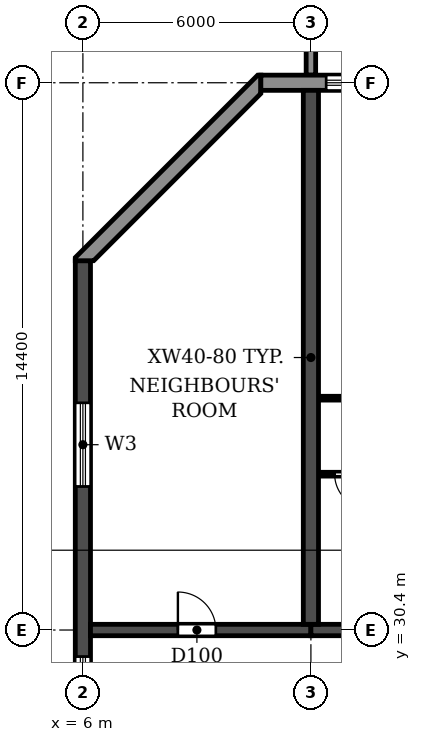
"""IFC4 building model, lengths in metres.
Left out: names, types, materials, properties, quantities, classifications, styles, units other than length and angle.
Written with IfcOpenShell. Run it as: python <this file> out.ifc"""

import sys

from ifc_helpers import new_model, si_unit, direction, frame, frame_2d, origin, place, context, subcontext, project, spatial, polyline, rectangle, outline, extrude, source, transform, mapped, element, fill, save


model = new_model("IFC4")
c1 = context("Model", 3, precision=1e-05, world=origin(), true_north=direction((0.0, 1.0)))
c2 = subcontext(c1, "Body", "Model", "MODEL_VIEW")
j1 = project(units=[si_unit("LENGTHUNIT", "METRE"), si_unit("PLANEANGLEUNIT", "RADIAN")], contexts=[c1])
p1 = place(None, origin())
s1 = spatial("IfcSite", under=j1, at=p1, CompositionType="ELEMENT")
p2 = place(p1, origin())
s2 = spatial("IfcBuilding", under=s1, at=p2, CompositionType="ELEMENT")
p3 = place(p2, frame((0.0, 0.0, 56.4)))
s3 = spatial("IfcBuildingStorey", under=s2, at=p3, CompositionType="ELEMENT", Elevation=56.4)
p4 = place(p3, frame((12.0, 30.55, 0.0), z_axis=(0.0, 0.0, 1.0), x_axis=(0.0, 1.0, 0.0)))
e1 = element("IfcWall", 1, at=p4, inside=s3, PredefinedType="SHEAR", context=c2, shape_type="SweptSolid", body=[
    extrude(rectangle(XDim=14.05, YDim=0.4, at=frame_2d((7.025, 0.0))), origin(), (0.0, 0.0, 1.0), 3.05),
])
p5 = place(p3, frame((6.0, 4.683, 0.0), z_axis=(0.0, 0.0, 1.0), x_axis=(0.0, 1.0, 0.0)))
e2 = element("IfcWall", 2, at=p5, inside=s3, PredefinedType="SHEAR", context=c2, shape_type="SweptSolid", body=[
    extrude(rectangle(XDim=35.434, YDim=0.4, at=frame_2d((17.717, 0.0))), origin(), (0.0, 0.0, 1.0), 3.05),
])
p6 = place(p5, frame((23.817, 0.0, 0.9)))
e3 = element("IfcOpeningElement", 3, at=p6, cuts=e2, PredefinedType="OPENING", context=c2, shape_type="SweptSolid", body=[
    extrude(rectangle(XDim=1.2, YDim=1.5, at=frame_2d((0.6, 0.75))), frame((0.0, 0.21, 0.0), z_axis=(0.0, -1.0, 0.0), x_axis=(1.0, 0.0, 0.0)), (0.0, 0.0, 1.0), 0.42),
])
p7 = place(p5, frame((8.017, 0.0, 0.9)))
e4 = element("IfcOpeningElement", 4, at=p7, cuts=e2, PredefinedType="OPENING", context=c2, shape_type="SweptSolid", body=[
    extrude(rectangle(XDim=1.2, YDim=1.5, at=frame_2d((0.6, 0.75))), frame((0.0, 0.21, 0.0), z_axis=(0.0, -1.0, 0.0), x_axis=(1.0, 0.0, 0.0)), (0.0, 0.0, 1.0), 0.42),
])
p8 = place(p5, frame((15.917, 0.0, 0.9)))
e5 = element("IfcOpeningElement", 5, at=p8, cuts=e2, PredefinedType="OPENING", context=c2, shape_type="SweptSolid", body=[
    extrude(rectangle(XDim=1.2, YDim=1.5, at=frame_2d((0.6, 0.75))), frame((0.0, 0.21, 0.0), z_axis=(0.0, -1.0, 0.0), x_axis=(1.0, 0.0, 0.0)), (0.0, 0.0, 1.0), 0.42),
])
p9 = place(p5, frame((29.493, 0.0, 0.6)))
e6 = element("IfcOpeningElement", 6, at=p9, cuts=e2, PredefinedType="OPENING", context=c2, shape_type="SweptSolid", body=[
    extrude(rectangle(XDim=2.2, YDim=1.8, at=frame_2d((1.1, 0.9))), frame((0.0, 0.21, 0.0), z_axis=(0.0, -1.0, 0.0), x_axis=(1.0, 0.0, 0.0)), (0.0, 0.0, 1.0), 0.42),
])
p10 = place(p5, frame((2.541, 0.0, 0.6)))
e7 = element("IfcOpeningElement", 7, at=p10, cuts=e2, PredefinedType="OPENING", context=c2, shape_type="SweptSolid", body=[
    extrude(rectangle(XDim=2.2, YDim=1.8, at=frame_2d((1.1, 0.9))), frame((0.0, 0.21, 0.0), z_axis=(0.0, -1.0, 0.0), x_axis=(1.0, 0.0, 0.0)), (0.0, 0.0, 1.0), 0.42),
])
p11 = place(p3, frame((6.2, 30.4, 0.0), z_axis=(0.0, 0.0, 1.0), x_axis=(1.0, 0.0, 0.0)))
e8 = element("IfcWall", 8, at=p11, inside=s3, PredefinedType="SHEAR", context=c2, shape_type="SweptSolid", body=[
    extrude(rectangle(XDim=5.8, YDim=0.3, at=frame_2d((2.9, 0.0))), origin(), (0.0, 0.0, 1.0), 2.45),
])
p12 = place(p11, frame((2.3, 0.0, 0.0)))
e9 = element("IfcOpeningElement", 9, at=p12, cuts=e8, PredefinedType="OPENING", context=c2, shape_type="SweptSolid", body=[
    extrude(rectangle(XDim=1.0, YDim=2.1, at=frame_2d((0.5, 1.05))), frame((0.0, 0.16, 0.0), z_axis=(0.0, -1.0, 0.0), x_axis=(1.0, 0.0, 0.0)), (0.0, 0.0, 1.0), 0.32),
])
p13 = place(p3, frame((12.0, 30.4, 0.0), z_axis=(0.0, 0.0, 1.0), x_axis=(1.0, 0.0, 0.0)))
e10 = element("IfcWall", 10, at=p13, inside=s3, PredefinedType="SHEAR", context=c2, shape_type="SweptSolid", body=[
    extrude(rectangle(XDim=6.0, YDim=0.3, at=frame_2d((3.0, 0.0))), origin(), (0.0, 0.0, 1.0), 2.45),
])
p14 = place(p13, frame((2.55, 0.0, 0.0)))
e11 = element("IfcOpeningElement", 11, at=p14, cuts=e10, PredefinedType="OPENING", context=c2, shape_type="SweptSolid", body=[
    extrude(rectangle(XDim=1.0, YDim=2.1, at=frame_2d((0.5, 1.05))), frame((0.0, 0.16, 0.0), z_axis=(0.0, -1.0, 0.0), x_axis=(1.0, 0.0, 0.0)), (0.0, 0.0, 1.0), 0.32),
])
p15 = place(p3, frame((91.317, 44.8, 0.0), z_axis=(0.0, 0.0, 1.0), x_axis=(-1.0, 0.0, 0.0)))
e12 = element("IfcWall", 12, at=p15, inside=s3, PredefinedType="STANDARD", context=c2, shape_type="SweptSolid", body=[
    extrude(rectangle(XDim=80.634, YDim=0.4, at=frame_2d((40.317, 0.0))), origin(), (0.0, 0.0, 1.0), 3.05),
])
p16 = place(p15, frame((76.717, 0.0, 0.9)))
e13 = element("IfcOpeningElement", 13, at=p16, cuts=e12, PredefinedType="OPENING", context=c2, shape_type="SweptSolid", body=[
    extrude(rectangle(XDim=2.2, YDim=1.5, at=frame_2d((1.1, 0.75))), frame((0.0, 0.21, 0.0), z_axis=(0.0, -1.0, 0.0), x_axis=(1.0, 0.0, 0.0)), (0.0, 0.0, 1.0), 0.42),
])
p17 = place(p15, frame((73.917, 0.0, 0.0)))
e14 = element("IfcOpeningElement", 14, at=p17, cuts=e12, PredefinedType="OPENING", context=c2, shape_type="SweptSolid", body=[
    extrude(rectangle(XDim=1.8, YDim=2.4, at=frame_2d((0.9, 1.2))), frame((0.0, 0.21, 0.0), z_axis=(0.0, -1.0, 0.0), x_axis=(1.0, 0.0, 0.0)), (0.0, 0.0, 1.0), 0.42),
])
p18 = place(p15, frame((70.717, 0.0, 0.9)))
e15 = element("IfcOpeningElement", 15, at=p18, cuts=e12, PredefinedType="OPENING", context=c2, shape_type="SweptSolid", body=[
    extrude(rectangle(XDim=2.2, YDim=1.5, at=frame_2d((1.1, 0.75))), frame((0.0, 0.21, 0.0), z_axis=(0.0, -1.0, 0.0), x_axis=(1.0, 0.0, 0.0)), (0.0, 0.0, 1.0), 0.42),
])
p19 = place(p15, frame((67.917, 0.0, 0.0)))
e16 = element("IfcOpeningElement", 16, at=p19, cuts=e12, PredefinedType="OPENING", context=c2, shape_type="SweptSolid", body=[
    extrude(rectangle(XDim=1.8, YDim=2.4, at=frame_2d((0.9, 1.2))), frame((0.0, 0.21, 0.0), z_axis=(0.0, -1.0, 0.0), x_axis=(1.0, 0.0, 0.0)), (0.0, 0.0, 1.0), 0.42),
])
p20 = place(p15, frame((64.717, 0.0, 0.9)))
e17 = element("IfcOpeningElement", 17, at=p20, cuts=e12, PredefinedType="OPENING", context=c2, shape_type="SweptSolid", body=[
    extrude(rectangle(XDim=2.2, YDim=1.5, at=frame_2d((1.1, 0.75))), frame((0.0, 0.21, 0.0), z_axis=(0.0, -1.0, 0.0), x_axis=(1.0, 0.0, 0.0)), (0.0, 0.0, 1.0), 0.42),
])
p21 = place(p15, frame((61.917, 0.0, 0.0)))
e18 = element("IfcOpeningElement", 18, at=p21, cuts=e12, PredefinedType="OPENING", context=c2, shape_type="SweptSolid", body=[
    extrude(rectangle(XDim=1.8, YDim=2.4, at=frame_2d((0.9, 1.2))), frame((0.0, 0.21, 0.0), z_axis=(0.0, -1.0, 0.0), x_axis=(1.0, 0.0, 0.0)), (0.0, 0.0, 1.0), 0.42),
])
p22 = place(p15, frame((58.717, 0.0, 0.9)))
e19 = element("IfcOpeningElement", 19, at=p22, cuts=e12, PredefinedType="OPENING", context=c2, shape_type="SweptSolid", body=[
    extrude(rectangle(XDim=2.2, YDim=1.5, at=frame_2d((1.1, 0.75))), frame((0.0, 0.21, 0.0), z_axis=(0.0, -1.0, 0.0), x_axis=(1.0, 0.0, 0.0)), (0.0, 0.0, 1.0), 0.42),
])
p23 = place(p15, frame((55.717, 0.0, 0.9)))
e20 = element("IfcOpeningElement", 20, at=p23, cuts=e12, PredefinedType="OPENING", context=c2, shape_type="SweptSolid", body=[
    extrude(rectangle(XDim=2.2, YDim=1.5, at=frame_2d((1.1, 0.75))), frame((0.0, 0.21, 0.0), z_axis=(0.0, -1.0, 0.0), x_axis=(1.0, 0.0, 0.0)), (0.0, 0.0, 1.0), 0.42),
])
p24 = place(p15, frame((52.917, 0.0, 0.0)))
e21 = element("IfcOpeningElement", 21, at=p24, cuts=e12, PredefinedType="OPENING", context=c2, shape_type="SweptSolid", body=[
    extrude(rectangle(XDim=1.8, YDim=2.4, at=frame_2d((0.9, 1.2))), frame((0.0, 0.21, 0.0), z_axis=(0.0, -1.0, 0.0), x_axis=(1.0, 0.0, 0.0)), (0.0, 0.0, 1.0), 0.42),
])
p25 = place(p15, frame((49.717, 0.0, 0.9)))
e22 = element("IfcOpeningElement", 22, at=p25, cuts=e12, PredefinedType="OPENING", context=c2, shape_type="SweptSolid", body=[
    extrude(rectangle(XDim=2.2, YDim=1.5, at=frame_2d((1.1, 0.75))), frame((0.0, 0.21, 0.0), z_axis=(0.0, -1.0, 0.0), x_axis=(1.0, 0.0, 0.0)), (0.0, 0.0, 1.0), 0.42),
])
p26 = place(p15, frame((46.917, 0.0, 0.0)))
e23 = element("IfcOpeningElement", 23, at=p26, cuts=e12, PredefinedType="OPENING", context=c2, shape_type="SweptSolid", body=[
    extrude(rectangle(XDim=1.8, YDim=2.4, at=frame_2d((0.9, 1.2))), frame((0.0, 0.21, 0.0), z_axis=(0.0, -1.0, 0.0), x_axis=(1.0, 0.0, 0.0)), (0.0, 0.0, 1.0), 0.42),
])
p27 = place(p15, frame((43.717, 0.0, 0.9)))
e24 = element("IfcOpeningElement", 24, at=p27, cuts=e12, PredefinedType="OPENING", context=c2, shape_type="SweptSolid", body=[
    extrude(rectangle(XDim=2.2, YDim=1.5, at=frame_2d((1.1, 0.75))), frame((0.0, 0.21, 0.0), z_axis=(0.0, -1.0, 0.0), x_axis=(1.0, 0.0, 0.0)), (0.0, 0.0, 1.0), 0.42),
])
p28 = place(p15, frame((40.717, 0.0, 0.9)))
e25 = element("IfcOpeningElement", 25, at=p28, cuts=e12, PredefinedType="OPENING", context=c2, shape_type="SweptSolid", body=[
    extrude(rectangle(XDim=2.2, YDim=1.5, at=frame_2d((1.1, 0.75))), frame((0.0, 0.21, 0.0), z_axis=(0.0, -1.0, 0.0), x_axis=(1.0, 0.0, 0.0)), (0.0, 0.0, 1.0), 0.42),
])
p29 = place(p15, frame((37.717, 0.0, 0.9)))
e26 = element("IfcOpeningElement", 26, at=p29, cuts=e12, PredefinedType="OPENING", context=c2, shape_type="SweptSolid", body=[
    extrude(rectangle(XDim=2.2, YDim=1.5, at=frame_2d((1.1, 0.75))), frame((0.0, 0.21, 0.0), z_axis=(0.0, -1.0, 0.0), x_axis=(1.0, 0.0, 0.0)), (0.0, 0.0, 1.0), 0.42),
])
p30 = place(p15, frame((34.717, 0.0, 0.9)))
e27 = element("IfcOpeningElement", 27, at=p30, cuts=e12, PredefinedType="OPENING", context=c2, shape_type="SweptSolid", body=[
    extrude(rectangle(XDim=2.2, YDim=1.5, at=frame_2d((1.1, 0.75))), frame((0.0, 0.21, 0.0), z_axis=(0.0, -1.0, 0.0), x_axis=(1.0, 0.0, 0.0)), (0.0, 0.0, 1.0), 0.42),
])
p31 = place(p15, frame((31.917, 0.0, 0.0)))
e28 = element("IfcOpeningElement", 28, at=p31, cuts=e12, PredefinedType="OPENING", context=c2, shape_type="SweptSolid", body=[
    extrude(rectangle(XDim=1.8, YDim=2.4, at=frame_2d((0.9, 1.2))), frame((0.0, 0.21, 0.0), z_axis=(0.0, -1.0, 0.0), x_axis=(1.0, 0.0, 0.0)), (0.0, 0.0, 1.0), 0.42),
])
p32 = place(p15, frame((28.917, 0.0, 0.0)))
e29 = element("IfcOpeningElement", 29, at=p32, cuts=e12, PredefinedType="OPENING", context=c2, shape_type="SweptSolid", body=[
    extrude(rectangle(XDim=1.8, YDim=2.4, at=frame_2d((0.9, 1.2))), frame((0.0, 0.21, 0.0), z_axis=(0.0, -1.0, 0.0), x_axis=(1.0, 0.0, 0.0)), (0.0, 0.0, 1.0), 0.42),
])
p33 = place(p15, frame((25.717, 0.0, 0.9)))
e30 = element("IfcOpeningElement", 30, at=p33, cuts=e12, PredefinedType="OPENING", context=c2, shape_type="SweptSolid", body=[
    extrude(rectangle(XDim=2.2, YDim=1.5, at=frame_2d((1.1, 0.75))), frame((0.0, 0.21, 0.0), z_axis=(0.0, -1.0, 0.0), x_axis=(1.0, 0.0, 0.0)), (0.0, 0.0, 1.0), 0.42),
])
p34 = place(p15, frame((22.917, 0.0, 0.0)))
e31 = element("IfcOpeningElement", 31, at=p34, cuts=e12, PredefinedType="OPENING", context=c2, shape_type="SweptSolid", body=[
    extrude(rectangle(XDim=1.8, YDim=2.4, at=frame_2d((0.9, 1.2))), frame((0.0, 0.21, 0.0), z_axis=(0.0, -1.0, 0.0), x_axis=(1.0, 0.0, 0.0)), (0.0, 0.0, 1.0), 0.42),
])
p35 = place(p15, frame((19.717, 0.0, 0.9)))
e32 = element("IfcOpeningElement", 32, at=p35, cuts=e12, PredefinedType="OPENING", context=c2, shape_type="SweptSolid", body=[
    extrude(rectangle(XDim=2.2, YDim=1.5, at=frame_2d((1.1, 0.75))), frame((0.0, 0.21, 0.0), z_axis=(0.0, -1.0, 0.0), x_axis=(1.0, 0.0, 0.0)), (0.0, 0.0, 1.0), 0.42),
])
p36 = place(p15, frame((16.917, 0.0, 0.0)))
e33 = element("IfcOpeningElement", 33, at=p36, cuts=e12, PredefinedType="OPENING", context=c2, shape_type="SweptSolid", body=[
    extrude(rectangle(XDim=1.8, YDim=2.4, at=frame_2d((0.9, 1.2))), frame((0.0, 0.21, 0.0), z_axis=(0.0, -1.0, 0.0), x_axis=(1.0, 0.0, 0.0)), (0.0, 0.0, 1.0), 0.42),
])
p37 = place(p15, frame((13.717, 0.0, 0.9)))
e34 = element("IfcOpeningElement", 34, at=p37, cuts=e12, PredefinedType="OPENING", context=c2, shape_type="SweptSolid", body=[
    extrude(rectangle(XDim=2.2, YDim=1.5, at=frame_2d((1.1, 0.75))), frame((0.0, 0.21, 0.0), z_axis=(0.0, -1.0, 0.0), x_axis=(1.0, 0.0, 0.0)), (0.0, 0.0, 1.0), 0.42),
])
p38 = place(p15, frame((10.917, 0.0, 0.0)))
e35 = element("IfcOpeningElement", 35, at=p38, cuts=e12, PredefinedType="OPENING", context=c2, shape_type="SweptSolid", body=[
    extrude(rectangle(XDim=1.8, YDim=2.4, at=frame_2d((0.9, 1.2))), frame((0.0, 0.21, 0.0), z_axis=(0.0, -1.0, 0.0), x_axis=(1.0, 0.0, 0.0)), (0.0, 0.0, 1.0), 0.42),
])
p39 = place(p15, frame((7.717, 0.0, 0.9)))
e36 = element("IfcOpeningElement", 36, at=p39, cuts=e12, PredefinedType="OPENING", context=c2, shape_type="SweptSolid", body=[
    extrude(rectangle(XDim=2.2, YDim=1.5, at=frame_2d((1.1, 0.75))), frame((0.0, 0.21, 0.0), z_axis=(0.0, -1.0, 0.0), x_axis=(1.0, 0.0, 0.0)), (0.0, 0.0, 1.0), 0.42),
])
p40 = place(p15, frame((4.717, 0.0, 0.9)))
e37 = element("IfcOpeningElement", 37, at=p40, cuts=e12, PredefinedType="OPENING", context=c2, shape_type="SweptSolid", body=[
    extrude(rectangle(XDim=2.2, YDim=1.5, at=frame_2d((1.1, 0.75))), frame((0.0, 0.21, 0.0), z_axis=(0.0, -1.0, 0.0), x_axis=(1.0, 0.0, 0.0)), (0.0, 0.0, 1.0), 0.42),
])
p41 = place(p15, frame((1.717, 0.0, 0.9)))
e38 = element("IfcOpeningElement", 38, at=p41, cuts=e12, PredefinedType="OPENING", context=c2, shape_type="SweptSolid", body=[
    extrude(rectangle(XDim=2.2, YDim=1.5, at=frame_2d((1.1, 0.75))), frame((0.0, 0.21, 0.0), z_axis=(0.0, -1.0, 0.0), x_axis=(1.0, 0.0, 0.0)), (0.0, 0.0, 1.0), 0.42),
])
p42 = place(p3, origin())
e39 = element("IfcWall", 39, at=p42, inside=s3, PredefinedType="STANDARD", context=c2, shape_type="SweptSolid", body=[
    extrude(outline(polyline([(10.683, 45.0), (10.6, 45.0), (5.8, 40.2), (5.8, 40.117), (6.283, 40.117), (10.683, 44.517), (10.683, 45.0)])), origin(), (0.0, 0.0, 1.0), 3.05),
])
m1 = source(origin(), c2, "Body", "SweptSolid", [
    extrude(outline(polyline([(0.0, 0.0), (0.25, 0.0), (0.25, 3.1), (0.0, 3.1), (0.0, 0.0)])), origin(), (0.0, 0.0, 1.0), 3.1),
])
p43 = place(p3, frame((11.875, 45.0, 0.0)))
e40 = element("IfcWall", 40, at=p43, inside=s3, PredefinedType="STANDARD", context=c2, shape_type="MappedRepresentation", body=[
    mapped(m1, transform((0.0, 0.0, 0.0))),
])
p44 = place(p3, frame((12.21, 34.5, 0.0), z_axis=(0.0, 0.0, 1.0), x_axis=(1.0, 0.0, 0.0)))
e41 = element("IfcWall", 41, at=p44, inside=s3, PredefinedType="PARTITIONING", context=c2, shape_type="SweptSolid", body=[
    extrude(rectangle(XDim=1.99, YDim=0.1, at=frame_2d((0.995, 0.0))), origin(), (0.0, 0.0, 1.0), 3.05),
])
p45 = place(p44, frame((0.415, 0.0, 0.0)))
e42 = element("IfcOpeningElement", 42, at=p45, cuts=e41, PredefinedType="OPENING", context=c2, shape_type="SweptSolid", body=[
    extrude(rectangle(XDim=0.9, YDim=2.1, at=frame_2d((0.45, 1.05))), frame((0.0, 0.06, 0.0), z_axis=(0.0, -1.0, 0.0), x_axis=(1.0, 0.0, 0.0)), (0.0, 0.0, 1.0), 0.12),
])
p46 = place(p3, frame((12.21, 36.5, 0.0), z_axis=(0.0, 0.0, 1.0), x_axis=(1.0, 0.0, 0.0)))
e43 = element("IfcWall", 43, at=p46, inside=s3, PredefinedType="PARTITIONING", context=c2, shape_type="SweptSolid", body=[
    extrude(rectangle(XDim=2.84, YDim=0.1, at=frame_2d((1.42, 0.0))), origin(), (0.0, 0.0, 1.0), 3.05),
])
p47 = place(p46, frame((1.39, 0.0, 0.0)))
e44 = element("IfcOpeningElement", 44, at=p47, cuts=e43, PredefinedType="OPENING", context=c2, shape_type="SweptSolid", body=[
    extrude(rectangle(XDim=0.9, YDim=2.1, at=frame_2d((0.45, 1.05))), frame((0.0, 0.06, 0.0), z_axis=(0.0, -1.0, 0.0), x_axis=(1.0, 0.0, 0.0)), (0.0, 0.0, 1.0), 0.12),
])
p48 = place(p16, origin())
e45 = element("IfcWindow", 45, at=p48, inside=s3, PartitioningType="DOUBLE_PANEL_HORIZONTAL", PredefinedType="WINDOW", context=c2, shape_type="SweptSolid", body=[
    extrude(rectangle(XDim=2.2, YDim=1.5, at=frame_2d((1.1, 0.75))), frame((0.0, 0.03, 0.0), z_axis=(0.0, -1.0, 0.0), x_axis=(1.0, 0.0, 0.0)), (0.0, 0.0, 1.0), 0.06),
])
fill(e13, e45)
p49 = place(p6, origin())
e46 = element("IfcWindow", 46, at=p49, inside=s3, PartitioningType="SINGLE_PANEL", PredefinedType="WINDOW", context=c2, shape_type="SweptSolid", body=[
    extrude(rectangle(XDim=1.2, YDim=1.5, at=frame_2d((0.6, 0.75))), frame((0.0, 0.03, 0.0), z_axis=(0.0, -1.0, 0.0), x_axis=(1.0, 0.0, 0.0)), (0.0, 0.0, 1.0), 0.06),
])
fill(e3, e46)
p50 = place(p9, origin())
e47 = element("IfcWindow", 47, at=p50, inside=s3, PartitioningType="DOUBLE_PANEL_HORIZONTAL", PredefinedType="WINDOW", context=c2, shape_type="SweptSolid", body=[
    extrude(rectangle(XDim=2.2, YDim=1.8, at=frame_2d((1.1, 0.9))), frame((0.0, 0.03, 0.0), z_axis=(0.0, -1.0, 0.0), x_axis=(1.0, 0.0, 0.0)), (0.0, 0.0, 1.0), 0.06),
])
fill(e6, e47)
p51 = place(p12, origin())
e48 = element("IfcDoor", 48, at=p51, inside=s3, OperationType="SINGLE_SWING_LEFT", PredefinedType="DOOR", context=c2, shape_type="SweptSolid", body=[
    extrude(rectangle(XDim=1.0, YDim=2.1, at=frame_2d((0.5, 1.05))), frame((0.0, 0.025, 0.0), z_axis=(0.0, -1.0, 0.0), x_axis=(1.0, 0.0, 0.0)), (0.0, 0.0, 1.0), 0.05),
])
fill(e9, e48)
p52 = place(p45, frame((0.9, 0.0, 0.0), z_axis=(0.0, 0.0, 1.0), x_axis=(-1.0, 0.0, 0.0)))
e49 = element("IfcDoor", 49, at=p52, inside=s3, OperationType="SINGLE_SWING_LEFT", PredefinedType="DOOR", context=c2, shape_type="SweptSolid", body=[
    extrude(rectangle(XDim=0.9, YDim=2.1, at=frame_2d((0.45, 1.05))), frame((0.0, 0.025, 0.0), z_axis=(0.0, -1.0, 0.0), x_axis=(1.0, 0.0, 0.0)), (0.0, 0.0, 1.0), 0.05),
])
fill(e42, e49)
save(model, sys.argv[1])
